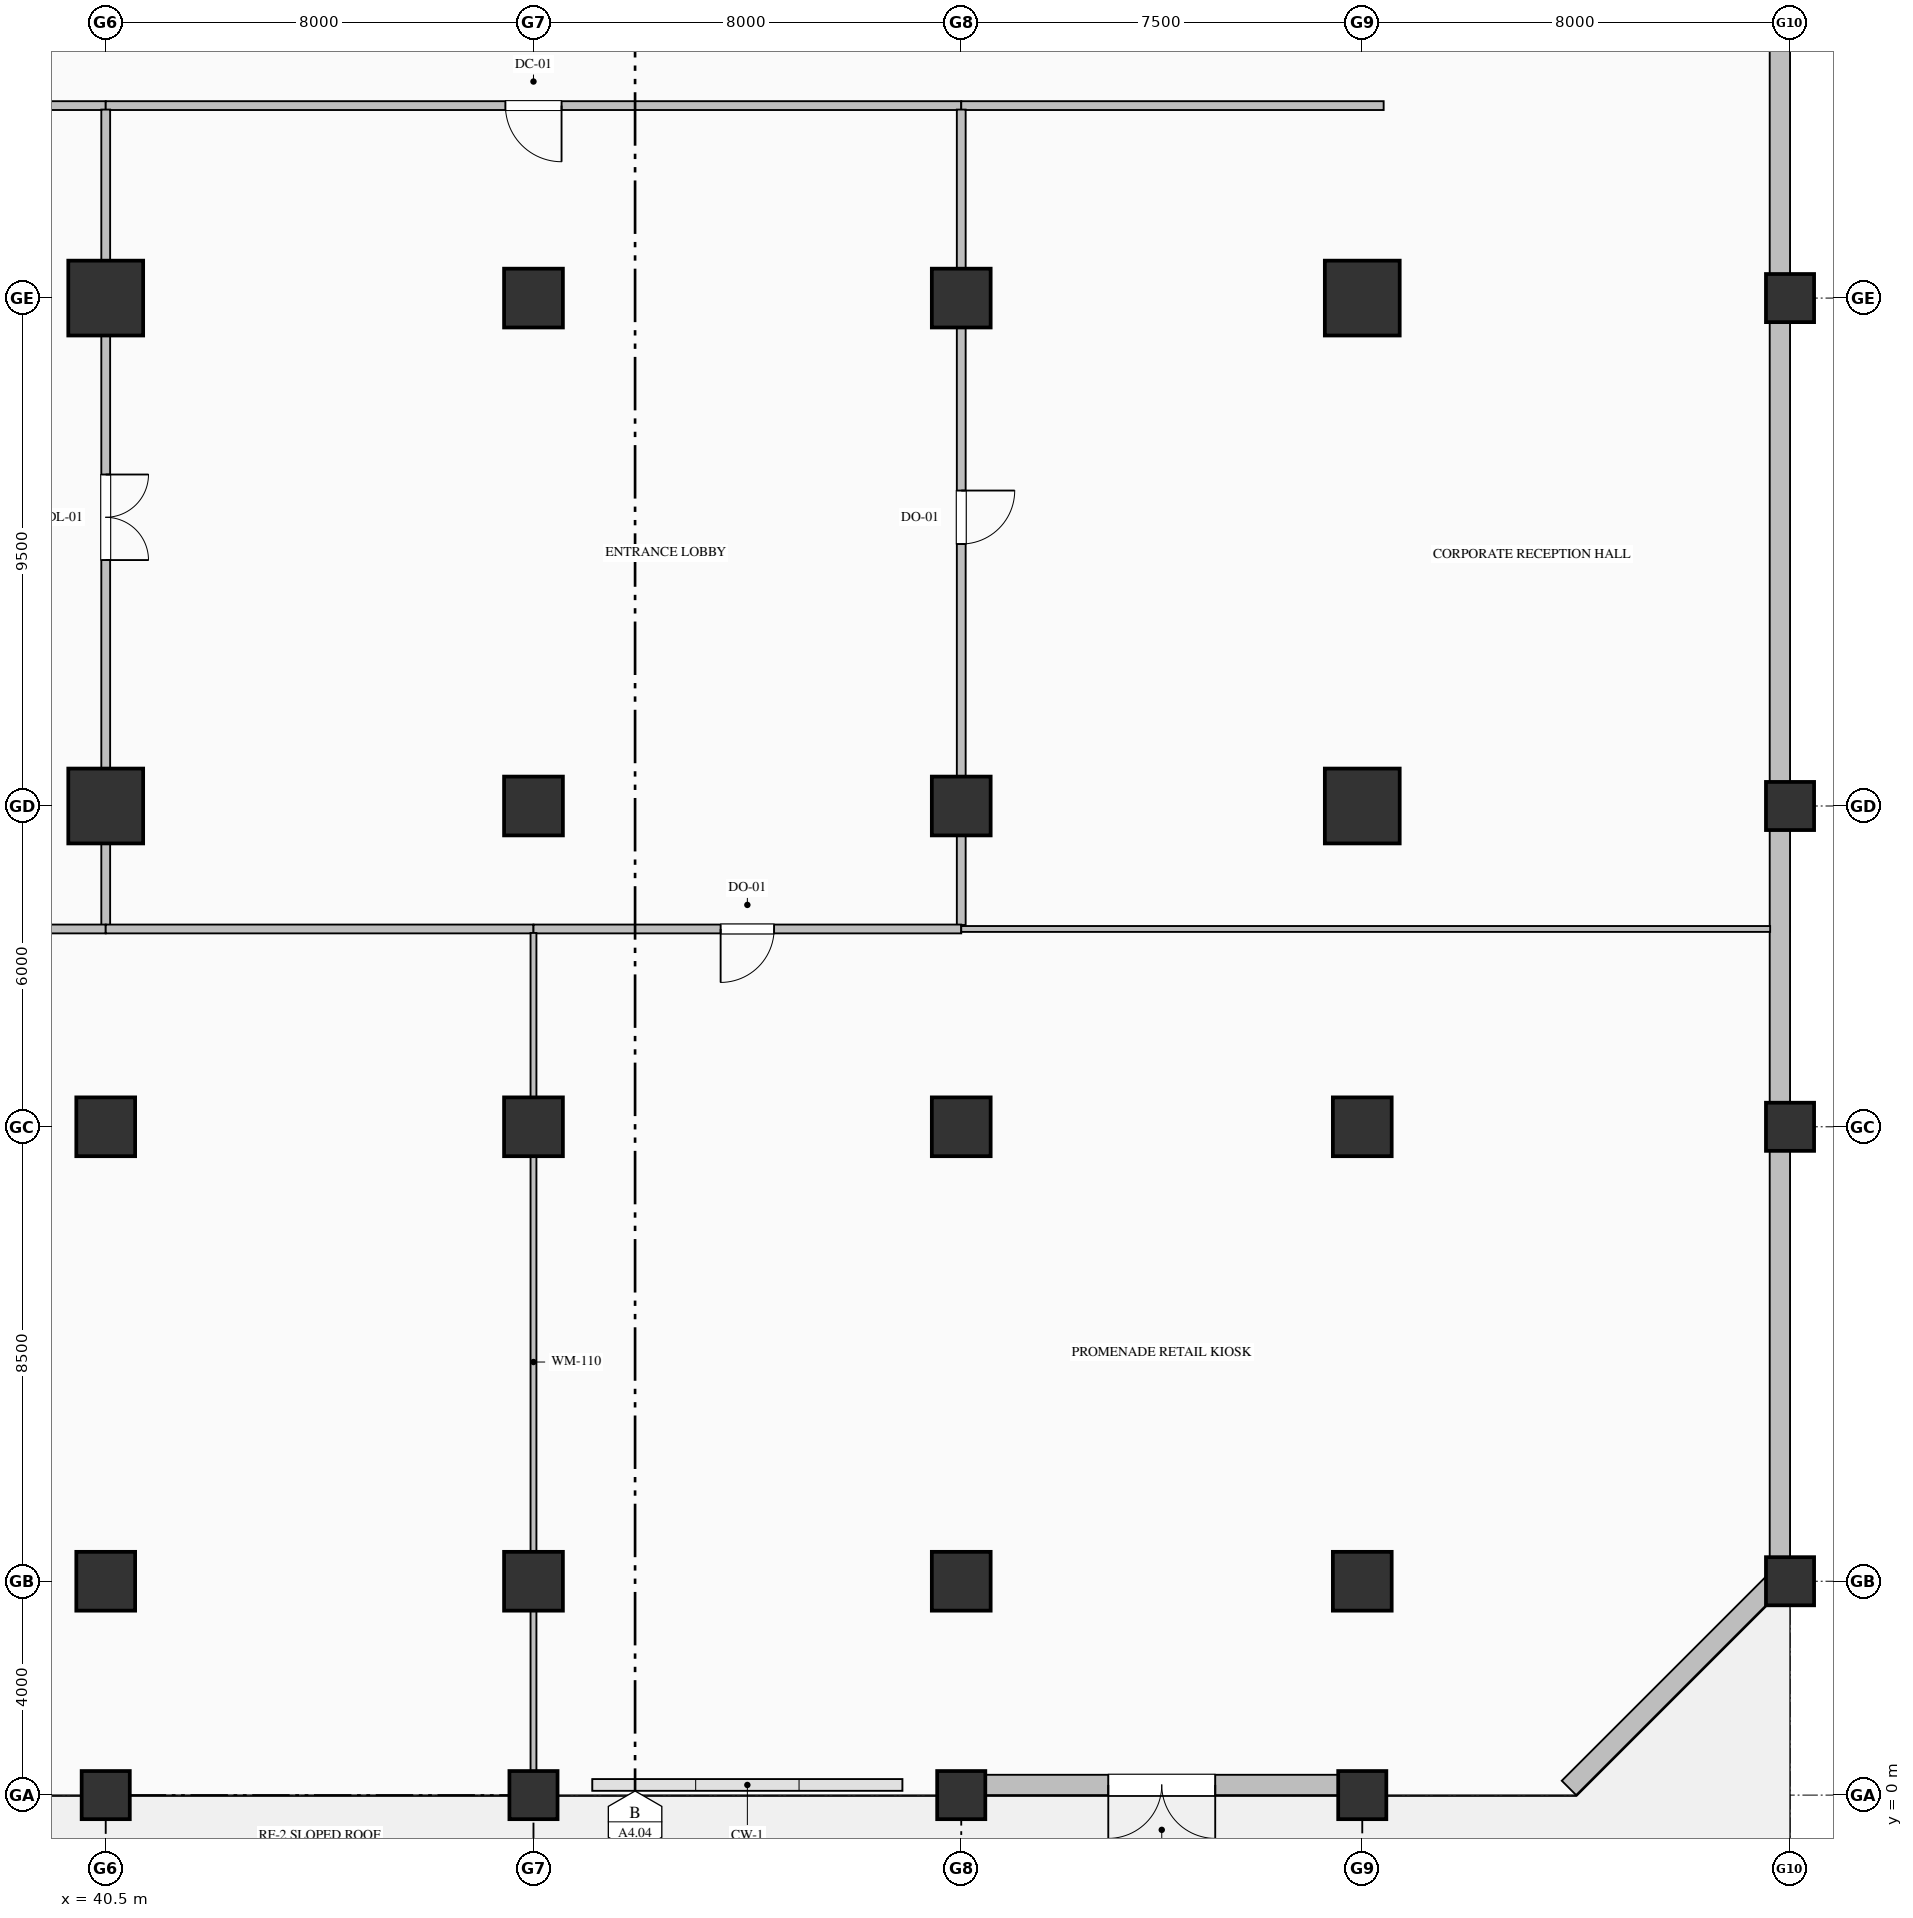
"""IFC4 building model, lengths in metres.
Left out: names, types, materials, properties, quantities, classifications, styles, units other than length and angle.
Written with IfcOpenShell. Run it as: python <this file> out.ifc"""

import sys

from ifc_helpers import new_model, si_unit, direction, frame, frame_2d, origin, origin_2d, place, context, subcontext, project, spatial, rectangle, hollow_rectangle, extrude, element, fill, save


model = new_model("IFC4")
c1 = context("Model", 3, precision=1e-05, world=origin(), true_north=direction((0.0, 1.0)))
c2 = subcontext(c1, "Body", "Model", "MODEL_VIEW")
j1 = project(units=[si_unit("LENGTHUNIT", "METRE"), si_unit("PLANEANGLEUNIT", "RADIAN")], contexts=[c1])
p1 = place(None, origin())
s1 = spatial("IfcSite", under=j1, at=p1, CompositionType="ELEMENT")
p2 = place(p1, origin())
s2 = spatial("IfcBuilding", under=s1, at=p2, CompositionType="ELEMENT")
p3 = place(p2, origin())
s3 = spatial("IfcBuildingStorey", under=s2, at=p3, CompositionType="ELEMENT", Elevation=0.0)
p4 = place(p3, frame((40.5, 0.0, 0.0), z_axis=(0.0, 0.0, 1.0), x_axis=(1.0, 0.0, 0.0)))
e1 = element("IfcColumn", 1, at=p4, inside=s3, PredefinedType="PILASTER", context=c2, shape_type="SweptSolid", body=[
    extrude(rectangle(XDim=0.9, YDim=0.9, at=origin_2d()), origin(), (0.0, 0.0, 1.0), 6.0),
])
for number, where, z_axis, x_axis in (
    (2, (40.5, 4.0, 0.0), (0.0, 0.0, 1.0), (1.0, 0.0, 0.0)),
    (3, (40.5, 12.5, 0.0), (0.0, 0.0, 1.0), (1.0, 0.0, 0.0)),
):
    element("IfcColumn", number, at=place(p3, frame(where, z_axis=z_axis, x_axis=x_axis)), inside=s3, PredefinedType="COLUMN", context=c2, shape_type="SweptSolid", body=[
        extrude(rectangle(XDim=1.1, YDim=1.1, at=origin_2d()), origin(), (0.0, 0.0, 1.0), 6.0),
    ])
for number, where, z_axis, x_axis in (
    (4, (40.5, 18.5, 0.0), (0.0, 0.0, 1.0), (1.0, 0.0, 0.0)),
    (5, (40.5, 28.0, 0.0), (0.0, 0.0, 1.0), (1.0, 0.0, 0.0)),
):
    element("IfcColumn", number, at=place(p3, frame(where, z_axis=z_axis, x_axis=x_axis)), inside=s3, PredefinedType="COLUMN", context=c2, shape_type="SweptSolid", body=[
        extrude(hollow_rectangle(XDim=1.4, YDim=1.4, WallThickness=0.05, at=origin_2d()), origin(), (0.0, 0.0, 1.0), 6.0),
    ])
p5 = place(p3, frame((48.5, 0.0, 0.0), z_axis=(0.0, 0.0, 1.0), x_axis=(1.0, 0.0, 0.0)))
e6 = element("IfcColumn", 6, at=p5, inside=s3, PredefinedType="PILASTER", context=c2, shape_type="SweptSolid", body=[
    extrude(rectangle(XDim=0.9, YDim=0.9, at=origin_2d()), origin(), (0.0, 0.0, 1.0), 6.0),
])
for number, where, z_axis, x_axis in (
    (7, (48.5, 4.0, 0.0), (0.0, 0.0, 1.0), (1.0, 0.0, 0.0)),
    (8, (48.5, 12.5, 0.0), (0.0, 0.0, 1.0), (1.0, 0.0, 0.0)),
    (9, (48.5, 18.5, 0.0), (0.0, 0.0, 1.0), (1.0, 0.0, 0.0)),
    (10, (48.5, 28.0, 0.0), (0.0, 0.0, 1.0), (1.0, 0.0, 0.0)),
):
    element("IfcColumn", number, at=place(p3, frame(where, z_axis=z_axis, x_axis=x_axis)), inside=s3, PredefinedType="COLUMN", context=c2, shape_type="SweptSolid", body=[
        extrude(rectangle(XDim=1.1, YDim=1.1, at=origin_2d()), origin(), (0.0, 0.0, 1.0), 6.0),
    ])
p6 = place(p3, frame((56.5, 0.0, 0.0), z_axis=(0.0, 0.0, 1.0), x_axis=(1.0, 0.0, 0.0)))
e11 = element("IfcColumn", 11, at=p6, inside=s3, PredefinedType="PILASTER", context=c2, shape_type="SweptSolid", body=[
    extrude(rectangle(XDim=0.9, YDim=0.9, at=origin_2d()), origin(), (0.0, 0.0, 1.0), 6.0),
])
for number, where, z_axis, x_axis in (
    (12, (56.5, 4.0, 0.0), (0.0, 0.0, 1.0), (1.0, 0.0, 0.0)),
    (13, (56.5, 12.5, 0.0), (0.0, 0.0, 1.0), (1.0, 0.0, 0.0)),
    (14, (56.5, 18.5, 0.0), (0.0, 0.0, 1.0), (1.0, 0.0, 0.0)),
    (15, (56.5, 28.0, 0.0), (0.0, 0.0, 1.0), (1.0, 0.0, 0.0)),
):
    element("IfcColumn", number, at=place(p3, frame(where, z_axis=z_axis, x_axis=x_axis)), inside=s3, PredefinedType="COLUMN", context=c2, shape_type="SweptSolid", body=[
        extrude(rectangle(XDim=1.1, YDim=1.1, at=origin_2d()), origin(), (0.0, 0.0, 1.0), 6.0),
    ])
p7 = place(p3, frame((64.0, 0.0, 0.0), z_axis=(0.0, 0.0, 1.0), x_axis=(1.0, 0.0, 0.0)))
e16 = element("IfcColumn", 16, at=p7, inside=s3, PredefinedType="PILASTER", context=c2, shape_type="SweptSolid", body=[
    extrude(rectangle(XDim=0.9, YDim=0.9, at=origin_2d()), origin(), (0.0, 0.0, 1.0), 6.0),
])
for number, where, z_axis, x_axis in (
    (17, (64.0, 4.0, 0.0), (0.0, 0.0, 1.0), (1.0, 0.0, 0.0)),
    (18, (64.0, 12.5, 0.0), (0.0, 0.0, 1.0), (1.0, 0.0, 0.0)),
):
    element("IfcColumn", number, at=place(p3, frame(where, z_axis=z_axis, x_axis=x_axis)), inside=s3, PredefinedType="COLUMN", context=c2, shape_type="SweptSolid", body=[
        extrude(rectangle(XDim=1.1, YDim=1.1, at=origin_2d()), origin(), (0.0, 0.0, 1.0), 6.0),
    ])
for number, where, z_axis, x_axis in (
    (19, (64.0, 18.5, 0.0), (0.0, 0.0, 1.0), (1.0, 0.0, 0.0)),
    (20, (64.0, 28.0, 0.0), (0.0, 0.0, 1.0), (1.0, 0.0, 0.0)),
):
    element("IfcColumn", number, at=place(p3, frame(where, z_axis=z_axis, x_axis=x_axis)), inside=s3, PredefinedType="COLUMN", context=c2, shape_type="SweptSolid", body=[
        extrude(hollow_rectangle(XDim=1.4, YDim=1.4, WallThickness=0.05, at=origin_2d()), origin(), (0.0, 0.0, 1.0), 6.0),
    ])
for number, where, z_axis, x_axis in (
    (21, (72.0, 4.0, 0.0), (0.0, 0.0, 1.0), (1.0, 0.0, 0.0)),
    (22, (72.0, 12.5, 0.0), (0.0, 0.0, 1.0), (1.0, 0.0, 0.0)),
    (23, (72.0, 18.5, 0.0), (0.0, 0.0, 1.0), (1.0, 0.0, 0.0)),
    (24, (72.0, 28.0, 0.0), (0.0, 0.0, 1.0), (1.0, 0.0, 0.0)),
):
    element("IfcColumn", number, at=place(p3, frame(where, z_axis=z_axis, x_axis=x_axis)), inside=s3, PredefinedType="PILASTER", context=c2, shape_type="SweptSolid", body=[
        extrude(rectangle(XDim=0.9, YDim=0.9, at=origin_2d()), origin(), (0.0, 0.0, 1.0), 6.0),
    ])
p8 = place(p3, frame((71.81, 48.0, 0.0), z_axis=(0.0, 0.0, 1.0), x_axis=(0.0, -1.0, 0.0)))
e25 = element("IfcWall", 25, at=p8, inside=s3, PredefinedType="SOLIDWALL", context=c2, shape_type="SweptSolid", body=[
    extrude(rectangle(XDim=44.0, YDim=0.38, at=frame_2d((22.0, 0.0))), origin(), (0.0, 0.0, 1.0), 5.22),
])
p9 = place(p8, frame((5.6, 0.0, 0.0)))
e26 = element("IfcOpeningElement", 26, at=p9, cuts=e25, PredefinedType="OPENING", context=c2, shape_type="SweptSolid", body=[
    extrude(rectangle(XDim=2.0, YDim=2.4, at=frame_2d((1.0, 1.2))), frame((0.0, 0.2, 0.0), z_axis=(0.0, -1.0, 0.0), x_axis=(1.0, 0.0, 0.0)), (0.0, 0.0, 1.0), 0.4),
])
p10 = place(p8, frame((0.5, 0.0, 0.0)))
e27 = element("IfcOpeningElement", 27, at=p10, cuts=e25, PredefinedType="OPENING", context=c2, shape_type="SweptSolid", body=[
    extrude(rectangle(XDim=1.4, YDim=2.25, at=frame_2d((0.7, 1.125))), frame((0.0, 0.2, 0.0), z_axis=(0.0, -1.0, 0.0), x_axis=(1.0, 0.0, 0.0)), (0.0, 0.0, 1.0), 0.4),
])
p11 = place(p3, frame((71.866, 4.134, 0.0), z_axis=(0.0, 0.0, 1.0), x_axis=(-0.707106781187, -0.707106781187, 0.0)))
e28 = element("IfcWall", 28, at=p11, inside=s3, PredefinedType="SOLIDWALL", context=c2, shape_type="SweptSolid", body=[
    extrude(rectangle(XDim=5.657, YDim=0.38, at=frame_2d((2.828, 0.0))), origin(), (0.0, 0.0, 1.0), 4.32),
])
p12 = place(p3, frame((63.57, 0.19, 0.0), z_axis=(0.0, 0.0, 1.0), x_axis=(-1.0, 0.0, 0.0)))
e29 = element("IfcWall", 29, at=p12, inside=s3, PredefinedType="SOLIDWALL", context=c2, shape_type="SweptSolid", body=[
    extrude(rectangle(XDim=6.64, YDim=0.38, at=frame_2d((3.32, 0.0))), origin(), (0.0, 0.0, 1.0), 5.22),
])
p13 = place(p12, frame((2.32, 0.0, 0.0)))
e30 = element("IfcOpeningElement", 30, at=p13, cuts=e29, PredefinedType="OPENING", context=c2, shape_type="SweptSolid", body=[
    extrude(rectangle(XDim=2.0, YDim=2.4, at=frame_2d((1.0, 1.2))), frame((0.0, 0.2, 0.0), z_axis=(0.0, -1.0, 0.0), x_axis=(1.0, 0.0, 0.0)), (0.0, 0.0, 1.0), 0.4),
])
p14 = place(p3, frame((40.5, 31.6, 0.0), z_axis=(0.0, 0.0, 1.0), x_axis=(-1.0, 0.0, 0.0)))
e31 = element("IfcWall", 31, at=p14, inside=s3, PredefinedType="PARTITIONING", context=c2, shape_type="SweptSolid", body=[
    extrude(rectangle(XDim=5.1, YDim=0.165, at=frame_2d((2.55, 0.0))), origin(), (0.0, 0.0, 1.0), 5.72),
])
p15 = place(p14, frame((2.025, 0.0, 0.0)))
e32 = element("IfcOpeningElement", 32, at=p15, cuts=e31, PredefinedType="OPENING", context=c2, shape_type="SweptSolid", body=[
    extrude(rectangle(XDim=1.05, YDim=2.15, at=frame_2d((0.525, 1.075))), frame((0.0, 0.093, 0.0), z_axis=(0.0, -1.0, 0.0), x_axis=(1.0, 0.0, 0.0)), (0.0, 0.0, 1.0), 0.185),
])
p16 = place(p3, frame((56.5, 31.6, 0.0), z_axis=(0.0, 0.0, 1.0), x_axis=(-1.0, 0.0, 0.0)))
e33 = element("IfcWall", 33, at=p16, inside=s3, PredefinedType="PARTITIONING", context=c2, shape_type="SweptSolid", body=[
    extrude(rectangle(XDim=16.0, YDim=0.165, at=frame_2d((8.0, 0.0))), origin(), (0.0, 0.0, 1.0), 5.72),
])
p17 = place(p16, frame((7.475, 0.0, 0.0)))
e34 = element("IfcOpeningElement", 34, at=p17, cuts=e33, PredefinedType="OPENING", context=c2, shape_type="SweptSolid", body=[
    extrude(rectangle(XDim=1.05, YDim=2.15, at=frame_2d((0.525, 1.075))), frame((0.0, 0.093, 0.0), z_axis=(0.0, -1.0, 0.0), x_axis=(1.0, 0.0, 0.0)), (0.0, 0.0, 1.0), 0.185),
])
p18 = place(p3, frame((64.4, 31.6, 0.0), z_axis=(0.0, 0.0, 1.0), x_axis=(-1.0, 0.0, 0.0)))
e35 = element("IfcWall", 35, at=p18, inside=s3, PredefinedType="PARTITIONING", context=c2, shape_type="SweptSolid", body=[
    extrude(rectangle(XDim=7.9, YDim=0.165, at=frame_2d((3.95, 0.0))), origin(), (0.0, 0.0, 1.0), 5.72),
])
p19 = place(p3, frame((40.5, 31.525, 0.0), z_axis=(0.0, 0.0, 1.0), x_axis=(0.0, -1.0, 0.0)))
e36 = element("IfcWall", 36, at=p19, inside=s3, PredefinedType="PARTITIONING", context=c2, shape_type="SweptSolid", body=[
    extrude(rectangle(XDim=15.251, YDim=0.165, at=frame_2d((7.625, 0.0))), origin(), (0.0, 0.0, 1.0), 4.812),
])
p20 = place(p19, frame((6.825, 0.0, 0.0)))
e37 = element("IfcOpeningElement", 37, at=p20, cuts=e36, PredefinedType="OPENING", context=c2, shape_type="SweptSolid", body=[
    extrude(rectangle(XDim=1.6, YDim=2.25, at=frame_2d((0.8, 1.125))), frame((0.0, 0.093, 0.0), z_axis=(0.0, -1.0, 0.0), x_axis=(1.0, 0.0, 0.0)), (0.0, 0.0, 1.0), 0.185),
])
p21 = place(p3, frame((40.5, 16.2, 0.0), z_axis=(0.0, 0.0, 1.0), x_axis=(-1.0, 0.0, 0.0)))
e38 = element("IfcWall", 38, at=p21, inside=s3, PredefinedType="PARTITIONING", context=c2, shape_type="SweptSolid", body=[
    extrude(rectangle(XDim=23.06, YDim=0.165, at=frame_2d((11.53, 0.0))), origin(), (0.0, 0.0, 1.0), 5.72),
])
p22 = place(p21, frame((10.53, 0.0, 0.0)))
e39 = element("IfcOpeningElement", 39, at=p22, cuts=e38, PredefinedType="OPENING", context=c2, shape_type="SweptSolid", body=[
    extrude(rectangle(XDim=2.0, YDim=2.4, at=frame_2d((1.0, 1.2))), frame((0.0, 0.093, 0.0), z_axis=(0.0, -1.0, 0.0), x_axis=(1.0, 0.0, 0.0)), (0.0, 0.0, 1.0), 0.185),
])
p23 = place(p3, frame((56.5, 31.525, 0.0), z_axis=(0.0, 0.0, 1.0), x_axis=(0.0, -1.0, 0.0)))
e40 = element("IfcWall", 40, at=p23, inside=s3, PredefinedType="PARTITIONING", context=c2, shape_type="SweptSolid", body=[
    extrude(rectangle(XDim=15.251, YDim=0.165, at=frame_2d((7.625, 0.0))), origin(), (0.0, 0.0, 1.0), 4.812),
])
p24 = place(p23, frame((7.125, 0.0, 0.0)))
e41 = element("IfcOpeningElement", 41, at=p24, cuts=e40, PredefinedType="OPENING", context=c2, shape_type="SweptSolid", body=[
    extrude(rectangle(XDim=1.0, YDim=2.15, at=frame_2d((0.5, 1.075))), frame((0.0, 0.093, 0.0), z_axis=(0.0, -1.0, 0.0), x_axis=(1.0, 0.0, 0.0)), (0.0, 0.0, 1.0), 0.185),
])
p25 = place(p3, frame((48.5, 16.2, 0.0), z_axis=(0.0, 0.0, 1.0), x_axis=(-1.0, 0.0, 0.0)))
e42 = element("IfcWall", 42, at=p25, inside=s3, PredefinedType="PARTITIONING", context=c2, shape_type="SweptSolid", body=[
    extrude(rectangle(XDim=8.0, YDim=0.165, at=frame_2d((4.0, 0.0))), origin(), (0.0, 0.0, 1.0), 5.72),
])
p26 = place(p3, frame((56.5, 16.2, 0.0), z_axis=(0.0, 0.0, 1.0), x_axis=(-1.0, 0.0, 0.0)))
e43 = element("IfcWall", 43, at=p26, inside=s3, PredefinedType="PARTITIONING", context=c2, shape_type="SweptSolid", body=[
    extrude(rectangle(XDim=8.0, YDim=0.165, at=frame_2d((4.0, 0.0))), origin(), (0.0, 0.0, 1.0), 5.72),
])
p27 = place(p26, frame((3.5, 0.0, 0.0)))
e44 = element("IfcOpeningElement", 44, at=p27, cuts=e43, PredefinedType="OPENING", context=c2, shape_type="SweptSolid", body=[
    extrude(rectangle(XDim=1.0, YDim=2.15, at=frame_2d((0.5, 1.075))), frame((0.0, 0.093, 0.0), z_axis=(0.0, -1.0, 0.0), x_axis=(1.0, 0.0, 0.0)), (0.0, 0.0, 1.0), 0.185),
])
p28 = place(p3, frame((71.628, 16.2, 0.0), z_axis=(0.0, 0.0, 1.0), x_axis=(-1.0, 0.0, 0.0)))
e45 = element("IfcWall", 45, at=p28, inside=s3, PredefinedType="MOVABLE", context=c2, shape_type="SweptSolid", body=[
    extrude(rectangle(XDim=15.128, YDim=0.11, at=frame_2d((7.564, 0.0))), origin(), (0.0, 0.0, 1.0), 5.72),
])
p29 = place(p3, frame((48.5, 16.125, 0.0), z_axis=(0.0, 0.0, 1.0), x_axis=(0.0, -1.0, 0.0)))
e46 = element("IfcWall", 46, at=p29, inside=s3, PredefinedType="MOVABLE", context=c2, shape_type="SweptSolid", body=[
    extrude(rectangle(XDim=16.051, YDim=0.11, at=frame_2d((8.025, 0.0))), origin(), (0.0, 0.0, 1.0), 4.812),
])
p30 = place(p13, origin())
e47 = element("IfcDoor", 47, at=p30, inside=s3, OperationType="DOUBLE_DOOR_SINGLE_SWING", PredefinedType="DOOR", context=c2, shape_type="SweptSolid", body=[
    extrude(rectangle(XDim=2.0, YDim=2.4, at=frame_2d((1.0, 1.2))), frame((0.0, 0.025, 0.0), z_axis=(0.0, -1.0, 0.0), x_axis=(1.0, 0.0, 0.0)), (0.0, 0.0, 1.0), 0.05),
])
fill(e30, e47)
p31 = place(p17, origin())
e48 = element("IfcDoor", 48, at=p31, inside=s3, OperationType="SINGLE_SWING_LEFT", PredefinedType="DOOR", context=c2, shape_type="SweptSolid", body=[
    extrude(rectangle(XDim=1.05, YDim=2.15, at=frame_2d((0.525, 1.075))), frame((0.0, 0.025, 0.0), z_axis=(0.0, -1.0, 0.0), x_axis=(1.0, 0.0, 0.0)), (0.0, 0.0, 1.0), 0.05),
])
fill(e34, e48)
p32 = place(p20, origin())
e49 = element("IfcDoor", 49, at=p32, inside=s3, OperationType="DOUBLE_DOOR_SINGLE_SWING", PredefinedType="DOOR", context=c2, shape_type="SweptSolid", body=[
    extrude(rectangle(XDim=1.6, YDim=2.25, at=frame_2d((0.8, 1.125))), frame((0.0, 0.025, 0.0), z_axis=(0.0, -1.0, 0.0), x_axis=(1.0, 0.0, 0.0)), (0.0, 0.0, 1.0), 0.05),
])
fill(e37, e49)
p33 = place(p24, origin())
e50 = element("IfcDoor", 50, at=p33, inside=s3, OperationType="SINGLE_SWING_LEFT", PredefinedType="DOOR", context=c2, shape_type="SweptSolid", body=[
    extrude(rectangle(XDim=1.0, YDim=2.15, at=frame_2d((0.5, 1.075))), frame((0.0, 0.025, 0.0), z_axis=(0.0, -1.0, 0.0), x_axis=(1.0, 0.0, 0.0)), (0.0, 0.0, 1.0), 0.05),
])
fill(e41, e50)
p34 = place(p27, origin())
e51 = element("IfcDoor", 51, at=p34, inside=s3, OperationType="SINGLE_SWING_RIGHT", PredefinedType="DOOR", context=c2, shape_type="SweptSolid", body=[
    extrude(rectangle(XDim=1.0, YDim=2.15, at=frame_2d((0.5, 1.075))), frame((0.0, 0.025, 0.0), z_axis=(0.0, -1.0, 0.0), x_axis=(1.0, 0.0, 0.0)), (0.0, 0.0, 1.0), 0.05),
])
fill(e44, e51)
save(model, sys.argv[1])
